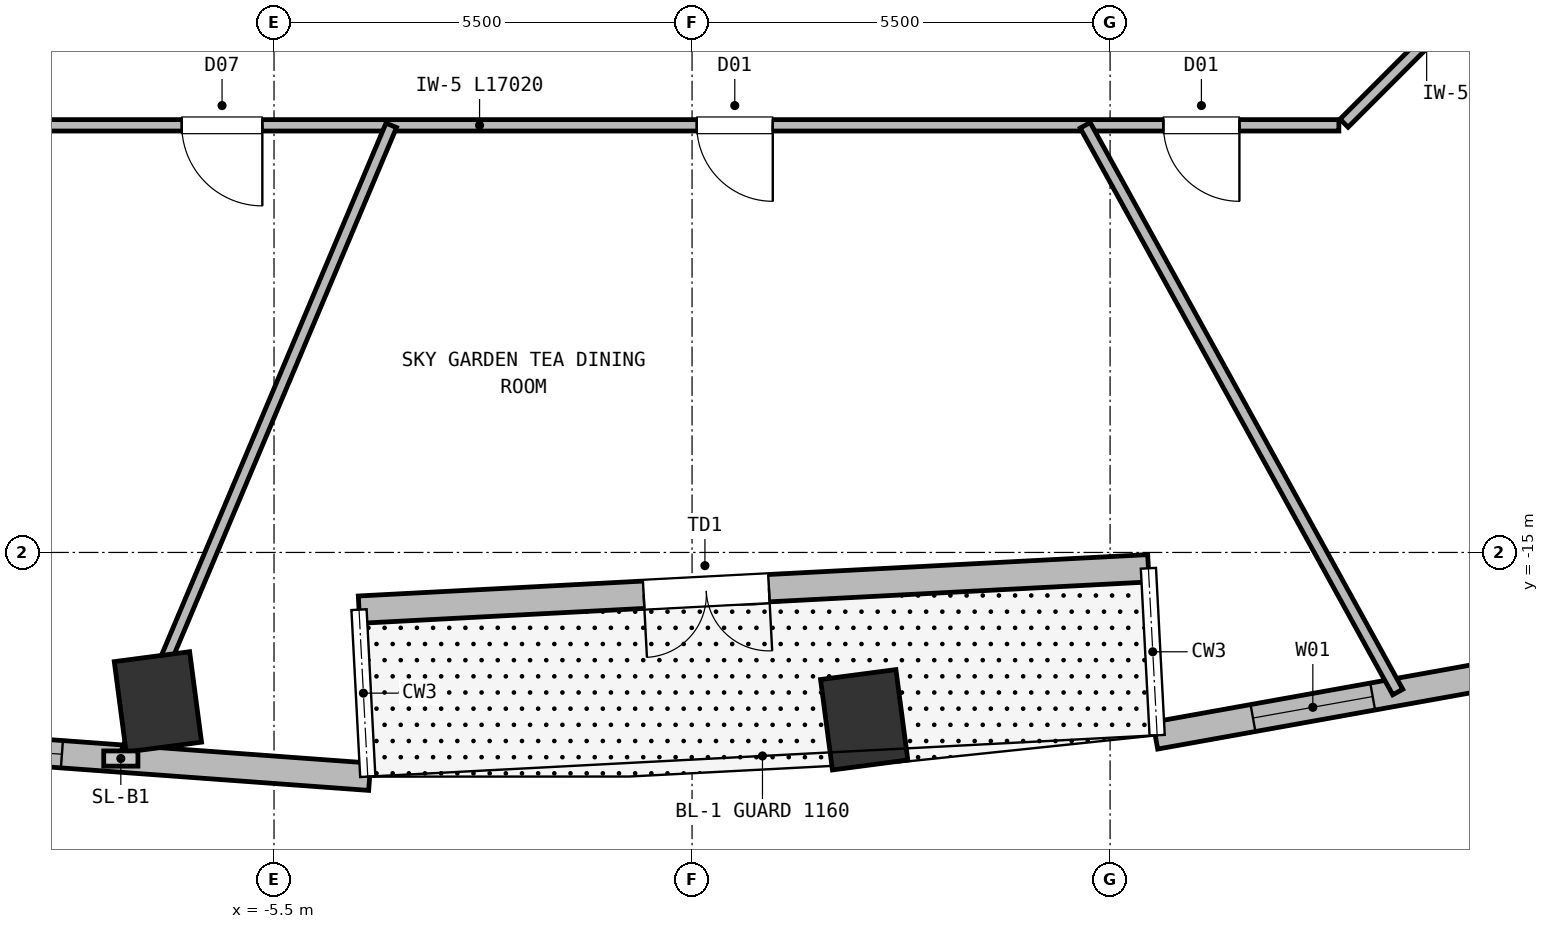
"""IFC4 building model, lengths in metres.
Left out: names, types, materials, properties, quantities, classifications, styles, units other than length and angle.
Written with IfcOpenShell. Run it as: python <this file> out.ifc"""

import sys

from ifc_helpers import new_model, si_unit, direction, frame, frame_2d, origin, origin_2d, place, context, subcontext, project, spatial, rectangle, extrude, element, fill, save


model = new_model("IFC4")
c1 = context("Model", 3, precision=1e-05, world=origin(), true_north=direction((0.0, 1.0)))
c2 = subcontext(c1, "Body", "Model", "MODEL_VIEW")
j1 = project(units=[si_unit("LENGTHUNIT", "METRE"), si_unit("PLANEANGLEUNIT", "RADIAN")], contexts=[c1])
p1 = place(None, origin())
s1 = spatial("IfcSite", under=j1, at=p1, CompositionType="ELEMENT")
p2 = place(p1, origin())
s2 = spatial("IfcBuilding", under=s1, at=p2, CompositionType="ELEMENT")
p3 = place(p2, frame((0.0, 0.0, 41.75)))
s3 = spatial("IfcBuildingStorey", under=s2, at=p3, CompositionType="ELEMENT", Elevation=41.75)
for number, where, z_axis, x_axis in (
    (1, (-7.028, -16.966, 0.0), (0.0, 0.0, 1.0), (0.991, 0.131, 0.0)),
    (2, (2.265, -17.202, 0.0), (0.0, 0.0, 1.0), (0.991, 0.131, 0.0)),
):
    element("IfcColumn", number, at=place(p3, frame(where, z_axis=z_axis, x_axis=x_axis)), inside=s3, PredefinedType="COLUMN", context=c2, shape_type="SweptSolid", body=[
        extrude(rectangle(XDim=1.0, YDim=1.2, at=origin_2d()), origin(), (0.0, 0.0, 1.0), 3.75),
    ])
p4 = place(p3, frame((6.004, -15.208, 0.0), z_axis=(0.0, 0.0, 1.0), x_axis=(-0.998630058509, -0.052325961458, 0.0)))
e3 = element("IfcWall", 3, at=p4, inside=s3, PredefinedType="SOLIDWALL", context=c2, shape_type="SweptSolid", body=[
    extrude(rectangle(XDim=10.4, YDim=0.36, at=frame_2d((5.2, 0.0))), origin(), (0.0, 0.0, 1.0), 3.5),
])
p5 = place(p4, frame((5.0, 0.0, 0.0)))
e4 = element("IfcOpeningElement", 4, at=p5, cuts=e3, PredefinedType="OPENING", context=c2, shape_type="SweptSolid", body=[
    extrude(rectangle(XDim=1.65, YDim=2.25, at=frame_2d((0.825, 1.125))), frame((0.0, 0.19, 0.0), z_axis=(0.0, -1.0, 0.0), x_axis=(1.0, 0.0, 0.0)), (0.0, 0.0, 1.0), 0.38),
])
p6 = place(p3, frame((-4.241, -17.951, 0.0), z_axis=(0.0, 0.0, 1.0), x_axis=(-0.997332601372, 0.072990973697, 0.0)))
e5 = element("IfcWall", 5, at=p6, inside=s3, PredefinedType="SOLIDWALL", context=c2, shape_type="SweptSolid", body=[
    extrude(rectangle(XDim=6.566, YDim=0.36, at=frame_2d((3.283, 0.0))), origin(), (0.0, 0.0, 1.0), 2.93),
])
p7 = place(p6, frame((4.06, 0.0, 0.72)))
e6 = element("IfcOpeningElement", 6, at=p7, cuts=e5, PredefinedType="OPENING", context=c2, shape_type="SweptSolid", body=[
    extrude(rectangle(XDim=1.6, YDim=1.88, at=frame_2d((0.8, 0.94))), frame((0.0, 0.19, 0.0), z_axis=(0.0, -1.0, 0.0), x_axis=(1.0, 0.0, 0.0)), (0.0, 0.0, 1.0), 0.38),
])
p8 = place(p3, frame((12.557, -16.249, 0.0), z_axis=(0.0, 0.0, 1.0), x_axis=(-0.984232555833, -0.176879269667, 0.0)))
e7 = element("IfcWall", 7, at=p8, inside=s3, PredefinedType="SOLIDWALL", context=c2, shape_type="SweptSolid", body=[
    extrude(rectangle(XDim=6.566, YDim=0.36, at=frame_2d((3.283, 0.0))), origin(), (0.0, 0.0, 1.0), 3.5),
])
p9 = place(p8, frame((3.66, 0.0, 0.72)))
e8 = element("IfcOpeningElement", 8, at=p9, cuts=e7, PredefinedType="OPENING", context=c2, shape_type="SweptSolid", body=[
    extrude(rectangle(XDim=1.6, YDim=1.88, at=frame_2d((0.8, 0.94))), frame((0.0, 0.19, 0.0), z_axis=(0.0, -1.0, 0.0), x_axis=(1.0, 0.0, 0.0)), (0.0, 0.0, 1.0), 0.38),
])
p10 = place(p3, frame((8.51, -9.38, 0.0), z_axis=(0.0, 0.0, 1.0), x_axis=(-1.0, 0.0, 0.0)))
e9 = element("IfcWall", 9, at=p10, inside=s3, PredefinedType="PARTITIONING", context=c2, shape_type="SweptSolid", body=[
    extrude(rectangle(XDim=17.02, YDim=0.15, at=frame_2d((8.51, 0.0))), origin(), (0.0, 0.0, 1.0), 3.5),
])
p11 = place(p10, frame((7.448, 0.0, 0.0)))
e10 = element("IfcOpeningElement", 10, at=p11, cuts=e9, PredefinedType="OPENING", context=c2, shape_type="SweptSolid", body=[
    extrude(rectangle(XDim=1.0, YDim=2.15, at=frame_2d((0.5, 1.075))), frame((0.0, 0.085, 0.0), z_axis=(0.0, -1.0, 0.0), x_axis=(1.0, 0.0, 0.0)), (0.0, 0.0, 1.0), 0.17),
])
p12 = place(p10, frame((1.309, 0.0, 0.0)))
e11 = element("IfcOpeningElement", 11, at=p12, cuts=e9, PredefinedType="OPENING", context=c2, shape_type="SweptSolid", body=[
    extrude(rectangle(XDim=1.0, YDim=2.15, at=frame_2d((0.5, 1.075))), frame((0.0, 0.085, 0.0), z_axis=(0.0, -1.0, 0.0), x_axis=(1.0, 0.0, 0.0)), (0.0, 0.0, 1.0), 0.17),
])
p13 = place(p10, frame((14.164, 0.0, 0.0)))
e12 = element("IfcOpeningElement", 12, at=p13, cuts=e9, PredefinedType="OPENING", context=c2, shape_type="SweptSolid", body=[
    extrude(rectangle(XDim=1.06, YDim=2.15, at=frame_2d((0.53, 1.075))), frame((0.0, 0.085, 0.0), z_axis=(0.0, -1.0, 0.0), x_axis=(1.0, 0.0, 0.0)), (0.0, 0.0, 1.0), 0.17),
])
p14 = place(p3, frame((10.752, -7.178, 0.0), z_axis=(0.0, 0.0, 1.0), x_axis=(-0.707067066127, -0.707146494016, 0.0)))
e13 = element("IfcWall", 13, at=p14, inside=s3, PredefinedType="PARTITIONING", context=c2, shape_type="SweptSolid", body=[
    extrude(rectangle(XDim=3.074, YDim=0.15, at=frame_2d((1.537, 0.0))), origin(), (0.0, 0.0, 1.0), 3.12),
])
p15 = place(p3, frame((-3.958, -9.38, 0.0), z_axis=(0.0, 0.0, 1.0), x_axis=(-0.388727710855, -0.921352683185, 0.0)))
e14 = element("IfcWall", 14, at=p15, inside=s3, PredefinedType="PARTITIONING", context=c2, shape_type="SweptSolid", body=[
    extrude(rectangle(XDim=9.046, YDim=0.15, at=frame_2d((4.523, 0.0))), origin(), (0.0, 0.0, 1.0), 3.5),
])
p16 = place(p3, frame((5.173, -9.38, 0.0), z_axis=(0.0, 0.0, 1.0), x_axis=(0.482894673272, -0.875678442424, 0.0)))
e15 = element("IfcWall", 15, at=p16, inside=s3, PredefinedType="PARTITIONING", context=c2, shape_type="SweptSolid", body=[
    extrude(rectangle(XDim=8.515, YDim=0.15, at=frame_2d((4.258, 0.0))), origin(), (0.0, 0.0, 1.0), 3.5),
])
p17 = place(p5, origin())
e16 = element("IfcDoor", 16, at=p17, inside=s3, OperationType="DOUBLE_DOOR_SINGLE_SWING", PredefinedType="DOOR", context=c2, shape_type="SweptSolid", body=[
    extrude(rectangle(XDim=1.65, YDim=2.25, at=frame_2d((0.825, 1.125))), frame((0.0, 0.025, 0.0), z_axis=(0.0, -1.0, 0.0), x_axis=(1.0, 0.0, 0.0)), (0.0, 0.0, 1.0), 0.05),
])
fill(e4, e16)
p18 = place(p7, origin())
e17 = element("IfcWindow", 17, at=p18, inside=s3, PartitioningType="SINGLE_PANEL", PredefinedType="WINDOW", context=c2, shape_type="SweptSolid", body=[
    extrude(rectangle(XDim=1.6, YDim=1.88, at=frame_2d((0.8, 0.94))), frame((0.0, 0.03, 0.0), z_axis=(0.0, -1.0, 0.0), x_axis=(1.0, 0.0, 0.0)), (0.0, 0.0, 1.0), 0.06),
])
fill(e6, e17)
p19 = place(p9, origin())
e18 = element("IfcWindow", 18, at=p19, inside=s3, PartitioningType="SINGLE_PANEL", PredefinedType="WINDOW", context=c2, shape_type="SweptSolid", body=[
    extrude(rectangle(XDim=1.6, YDim=1.88, at=frame_2d((0.8, 0.94))), frame((0.0, 0.03, 0.0), z_axis=(0.0, -1.0, 0.0), x_axis=(1.0, 0.0, 0.0)), (0.0, 0.0, 1.0), 0.06),
])
fill(e8, e18)
p20 = place(p11, origin())
e19 = element("IfcDoor", 19, at=p20, inside=s3, OperationType="SINGLE_SWING_LEFT", PredefinedType="DOOR", context=c2, shape_type="SweptSolid", body=[
    extrude(rectangle(XDim=1.0, YDim=2.15, at=frame_2d((0.5, 1.075))), frame((0.0, 0.025, 0.0), z_axis=(0.0, -1.0, 0.0), x_axis=(1.0, 0.0, 0.0)), (0.0, 0.0, 1.0), 0.05),
])
fill(e10, e19)
p21 = place(p12, origin())
e20 = element("IfcDoor", 20, at=p21, inside=s3, OperationType="SINGLE_SWING_LEFT", PredefinedType="DOOR", context=c2, shape_type="SweptSolid", body=[
    extrude(rectangle(XDim=1.0, YDim=2.15, at=frame_2d((0.5, 1.075))), frame((0.0, 0.025, 0.0), z_axis=(0.0, -1.0, 0.0), x_axis=(1.0, 0.0, 0.0)), (0.0, 0.0, 1.0), 0.05),
])
fill(e11, e20)
p22 = place(p13, origin())
e21 = element("IfcDoor", 21, at=p22, inside=s3, OperationType="SINGLE_SWING_LEFT", PredefinedType="DOOR", context=c2, shape_type="SweptSolid", body=[
    extrude(rectangle(XDim=1.06, YDim=2.15, at=frame_2d((0.53, 1.075))), frame((0.0, 0.025, 0.0), z_axis=(0.0, -1.0, 0.0), x_axis=(1.0, 0.0, 0.0)), (0.0, 0.0, 1.0), 0.05),
])
fill(e12, e21)
save(model, sys.argv[1])
